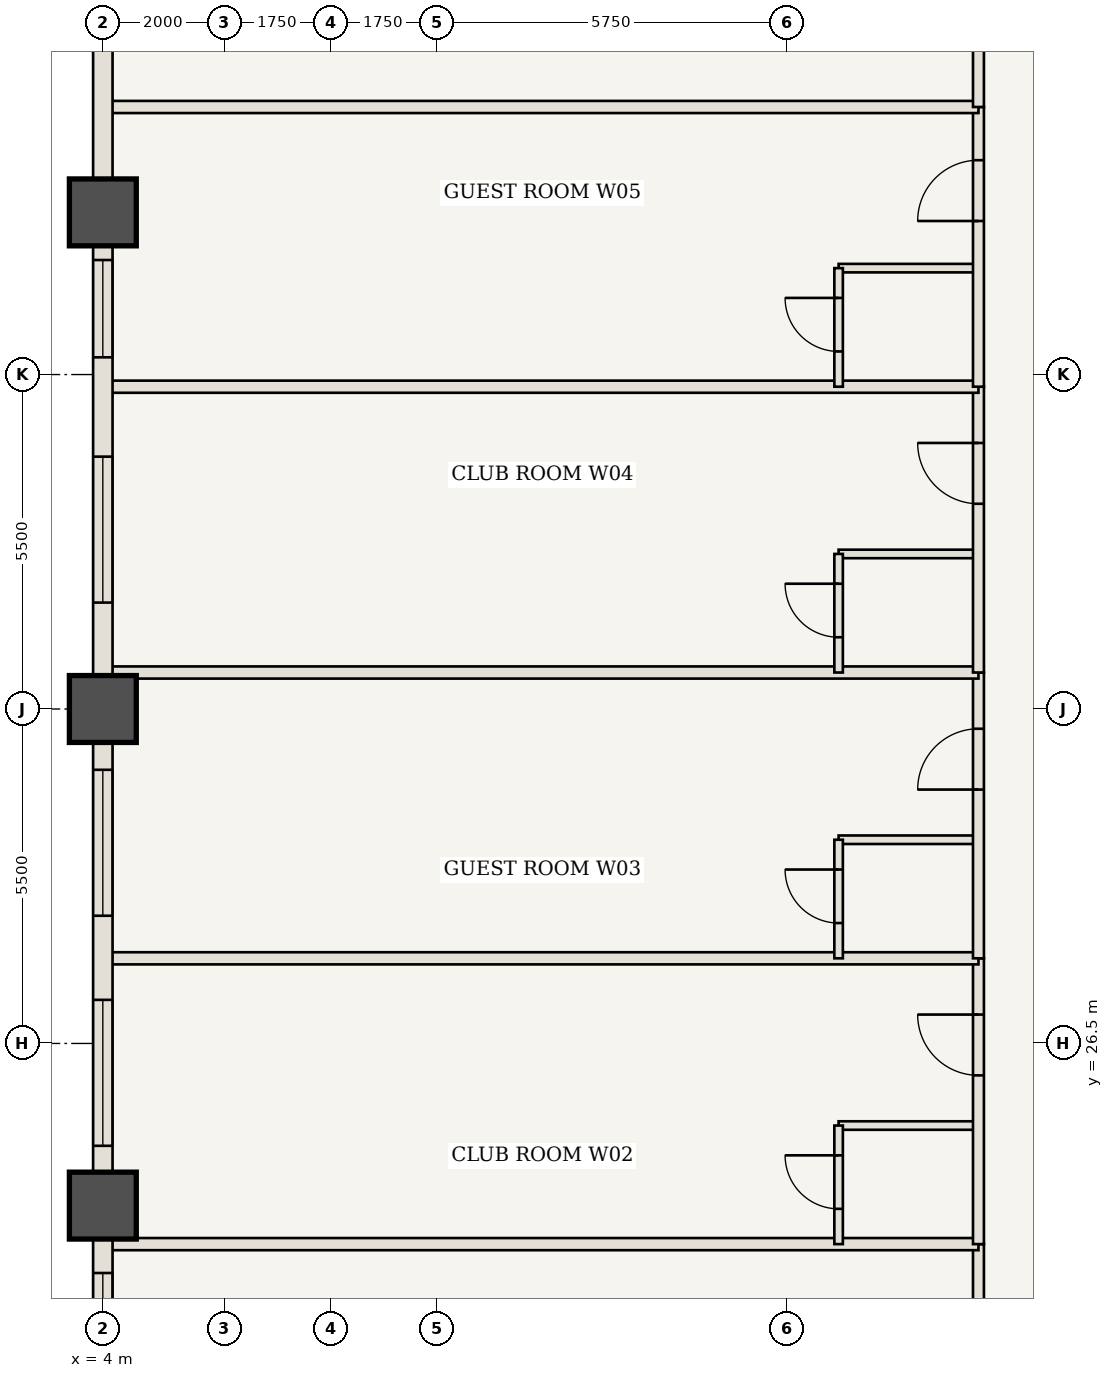
"""IFC4 building model, lengths in metres.
Left out: names, types, materials, properties, quantities, classifications, styles, units other than length and angle.
Written with IfcOpenShell. Run it as: python <this file> out.ifc"""

import sys

from ifc_helpers import new_model, si_unit, direction, frame, frame_2d, origin, origin_2d, place, context, subcontext, project, spatial, rectangle, extrude, element, fill, save


model = new_model("IFC4")
c1 = context("Model", 3, precision=1e-05, world=origin(), true_north=direction((0.0, 1.0)))
c2 = subcontext(c1, "Body", "Model", "MODEL_VIEW")
j1 = project(units=[si_unit("LENGTHUNIT", "METRE"), si_unit("PLANEANGLEUNIT", "RADIAN")], contexts=[c1])
p1 = place(None, origin())
s1 = spatial("IfcSite", under=j1, at=p1, CompositionType="ELEMENT")
p2 = place(p1, origin())
s2 = spatial("IfcBuilding", under=s1, at=p2, CompositionType="ELEMENT")
p3 = place(p2, frame((0.0, 0.0, 38.85)))
s3 = spatial("IfcBuildingStorey", under=s2, at=p3, CompositionType="ELEMENT", Elevation=38.85)
for number, where, z_axis, x_axis in (
    (1, (4.0, 23.833, 0.0), (0.0, 0.0, 1.0), (1.0, 0.0, 0.0)),
    (2, (4.0, 32.0, 0.0), (0.0, 0.0, 1.0), (1.0, 0.0, 0.0)),
    (3, (4.0, 40.167, 0.0), (0.0, 0.0, 1.0), (1.0, 0.0, 0.0)),
):
    element("IfcColumn", number, at=place(p3, frame(where, z_axis=z_axis, x_axis=x_axis)), inside=s3, PredefinedType="COLUMN", context=c2, shape_type="SweptSolid", body=[
        extrude(rectangle(XDim=1.1, YDim=1.1, at=origin_2d()), origin(), (0.0, 0.0, 1.0), 3.5),
    ])
p4 = place(p3, frame((18.4, 18.4, 0.0), z_axis=(0.0, 0.0, 1.0), x_axis=(0.0, 1.0, 0.0)))
e4 = element("IfcWall", 4, at=p4, inside=s3, PredefinedType="STANDARD", context=c2, shape_type="SweptSolid", body=[
    extrude(rectangle(XDim=4.8, YDim=0.18, at=frame_2d((2.4, 0.0))), origin(), (0.0, 0.0, 1.0), 3.08),
])
p5 = place(p4, frame((2.825, 0.0, 0.0)))
e5 = element("IfcOpeningElement", 5, at=p5, cuts=e4, PredefinedType="OPENING", context=c2, shape_type="SweptSolid", body=[
    extrude(rectangle(XDim=1.0, YDim=2.15, at=frame_2d((0.5, 1.075))), frame((0.0, 0.1, 0.0), z_axis=(0.0, -1.0, 0.0), x_axis=(1.0, 0.0, 0.0)), (0.0, 0.0, 1.0), 0.2),
])
p6 = place(p3, frame((4.06, 23.2, 0.0), z_axis=(0.0, 0.0, 1.0), x_axis=(1.0, 0.0, 0.0)))
e6 = element("IfcWall", 6, at=p6, inside=s3, PredefinedType="STANDARD", context=c2, shape_type="SweptSolid", body=[
    extrude(rectangle(XDim=14.34, YDim=0.2, at=frame_2d((7.17, 0.0))), origin(), (0.0, 0.0, 1.0), 3.08),
])
p7 = place(p3, frame((16.1, 25.15, 0.0), z_axis=(0.0, 0.0, 1.0), x_axis=(1.0, 0.0, 0.0)))
e7 = element("IfcWall", 7, at=p7, inside=s3, PredefinedType="STANDARD", context=c2, shape_type="SweptSolid", body=[
    extrude(rectangle(XDim=2.3, YDim=0.14, at=frame_2d((1.15, 0.0))), origin(), (0.0, 0.0, 1.0), 3.08),
])
p8 = place(p3, frame((16.1, 23.2, 0.0), z_axis=(0.0, 0.0, 1.0), x_axis=(0.0, 1.0, 0.0)))
e8 = element("IfcWall", 8, at=p8, inside=s3, PredefinedType="STANDARD", context=c2, shape_type="SweptSolid", body=[
    extrude(rectangle(XDim=1.95, YDim=0.14, at=frame_2d((0.975, 0.0))), origin(), (0.0, 0.0, 1.0), 3.08),
])
p9 = place(p8, frame((0.58, 0.0, 0.0)))
e9 = element("IfcOpeningElement", 9, at=p9, cuts=e8, PredefinedType="OPENING", context=c2, shape_type="SweptSolid", body=[
    extrude(rectangle(XDim=0.88, YDim=2.1, at=frame_2d((0.44, 1.05))), frame((0.0, 0.08, 0.0), z_axis=(0.0, -1.0, 0.0), x_axis=(1.0, 0.0, 0.0)), (0.0, 0.0, 1.0), 0.16),
])
p10 = place(p3, frame((18.4, 23.2, 0.0), z_axis=(0.0, 0.0, 1.0), x_axis=(0.0, 1.0, 0.0)))
e10 = element("IfcWall", 10, at=p10, inside=s3, PredefinedType="STANDARD", context=c2, shape_type="SweptSolid", body=[
    extrude(rectangle(XDim=4.7, YDim=0.18, at=frame_2d((2.35, 0.0))), origin(), (0.0, 0.0, 1.0), 3.08),
])
p11 = place(p10, frame((2.775, 0.0, 0.0)))
e11 = element("IfcOpeningElement", 11, at=p11, cuts=e10, PredefinedType="OPENING", context=c2, shape_type="SweptSolid", body=[
    extrude(rectangle(XDim=1.0, YDim=2.15, at=frame_2d((0.5, 1.075))), frame((0.0, 0.1, 0.0), z_axis=(0.0, -1.0, 0.0), x_axis=(1.0, 0.0, 0.0)), (0.0, 0.0, 1.0), 0.2),
])
p12 = place(p3, frame((4.06, 27.9, 0.0), z_axis=(0.0, 0.0, 1.0), x_axis=(1.0, 0.0, 0.0)))
e12 = element("IfcWall", 12, at=p12, inside=s3, PredefinedType="STANDARD", context=c2, shape_type="SweptSolid", body=[
    extrude(rectangle(XDim=14.34, YDim=0.2, at=frame_2d((7.17, 0.0))), origin(), (0.0, 0.0, 1.0), 3.08),
])
p13 = place(p3, frame((16.1, 29.85, 0.0), z_axis=(0.0, 0.0, 1.0), x_axis=(1.0, 0.0, 0.0)))
e13 = element("IfcWall", 13, at=p13, inside=s3, PredefinedType="STANDARD", context=c2, shape_type="SweptSolid", body=[
    extrude(rectangle(XDim=2.3, YDim=0.14, at=frame_2d((1.15, 0.0))), origin(), (0.0, 0.0, 1.0), 3.08),
])
p14 = place(p3, frame((16.1, 27.9, 0.0), z_axis=(0.0, 0.0, 1.0), x_axis=(0.0, 1.0, 0.0)))
e14 = element("IfcWall", 14, at=p14, inside=s3, PredefinedType="STANDARD", context=c2, shape_type="SweptSolid", body=[
    extrude(rectangle(XDim=1.95, YDim=0.14, at=frame_2d((0.975, 0.0))), origin(), (0.0, 0.0, 1.0), 3.08),
])
p15 = place(p14, frame((0.58, 0.0, 0.0)))
e15 = element("IfcOpeningElement", 15, at=p15, cuts=e14, PredefinedType="OPENING", context=c2, shape_type="SweptSolid", body=[
    extrude(rectangle(XDim=0.88, YDim=2.1, at=frame_2d((0.44, 1.05))), frame((0.0, 0.08, 0.0), z_axis=(0.0, -1.0, 0.0), x_axis=(1.0, 0.0, 0.0)), (0.0, 0.0, 1.0), 0.16),
])
p16 = place(p3, frame((18.4, 27.9, 0.0), z_axis=(0.0, 0.0, 1.0), x_axis=(0.0, 1.0, 0.0)))
e16 = element("IfcWall", 16, at=p16, inside=s3, PredefinedType="STANDARD", context=c2, shape_type="SweptSolid", body=[
    extrude(rectangle(XDim=4.7, YDim=0.18, at=frame_2d((2.35, 0.0))), origin(), (0.0, 0.0, 1.0), 3.08),
])
p17 = place(p16, frame((2.775, 0.0, 0.0)))
e17 = element("IfcOpeningElement", 17, at=p17, cuts=e16, PredefinedType="OPENING", context=c2, shape_type="SweptSolid", body=[
    extrude(rectangle(XDim=1.0, YDim=2.15, at=frame_2d((0.5, 1.075))), frame((0.0, 0.1, 0.0), z_axis=(0.0, -1.0, 0.0), x_axis=(1.0, 0.0, 0.0)), (0.0, 0.0, 1.0), 0.2),
])
p18 = place(p3, frame((4.06, 32.6, 0.0), z_axis=(0.0, 0.0, 1.0), x_axis=(1.0, 0.0, 0.0)))
e18 = element("IfcWall", 18, at=p18, inside=s3, PredefinedType="STANDARD", context=c2, shape_type="SweptSolid", body=[
    extrude(rectangle(XDim=14.34, YDim=0.2, at=frame_2d((7.17, 0.0))), origin(), (0.0, 0.0, 1.0), 3.08),
])
p19 = place(p3, frame((16.1, 34.55, 0.0), z_axis=(0.0, 0.0, 1.0), x_axis=(1.0, 0.0, 0.0)))
e19 = element("IfcWall", 19, at=p19, inside=s3, PredefinedType="STANDARD", context=c2, shape_type="SweptSolid", body=[
    extrude(rectangle(XDim=2.3, YDim=0.14, at=frame_2d((1.15, 0.0))), origin(), (0.0, 0.0, 1.0), 3.08),
])
p20 = place(p3, frame((16.1, 32.6, 0.0), z_axis=(0.0, 0.0, 1.0), x_axis=(0.0, 1.0, 0.0)))
e20 = element("IfcWall", 20, at=p20, inside=s3, PredefinedType="STANDARD", context=c2, shape_type="SweptSolid", body=[
    extrude(rectangle(XDim=1.95, YDim=0.14, at=frame_2d((0.975, 0.0))), origin(), (0.0, 0.0, 1.0), 3.08),
])
p21 = place(p20, frame((0.58, 0.0, 0.0)))
e21 = element("IfcOpeningElement", 21, at=p21, cuts=e20, PredefinedType="OPENING", context=c2, shape_type="SweptSolid", body=[
    extrude(rectangle(XDim=0.88, YDim=2.1, at=frame_2d((0.44, 1.05))), frame((0.0, 0.08, 0.0), z_axis=(0.0, -1.0, 0.0), x_axis=(1.0, 0.0, 0.0)), (0.0, 0.0, 1.0), 0.16),
])
p22 = place(p3, frame((18.4, 32.6, 0.0), z_axis=(0.0, 0.0, 1.0), x_axis=(0.0, 1.0, 0.0)))
e22 = element("IfcWall", 22, at=p22, inside=s3, PredefinedType="STANDARD", context=c2, shape_type="SweptSolid", body=[
    extrude(rectangle(XDim=4.7, YDim=0.18, at=frame_2d((2.35, 0.0))), origin(), (0.0, 0.0, 1.0), 3.08),
])
p23 = place(p22, frame((2.775, 0.0, 0.0)))
e23 = element("IfcOpeningElement", 23, at=p23, cuts=e22, PredefinedType="OPENING", context=c2, shape_type="SweptSolid", body=[
    extrude(rectangle(XDim=1.0, YDim=2.15, at=frame_2d((0.5, 1.075))), frame((0.0, 0.1, 0.0), z_axis=(0.0, -1.0, 0.0), x_axis=(1.0, 0.0, 0.0)), (0.0, 0.0, 1.0), 0.2),
])
p24 = place(p3, frame((4.06, 37.3, 0.0), z_axis=(0.0, 0.0, 1.0), x_axis=(1.0, 0.0, 0.0)))
e24 = element("IfcWall", 24, at=p24, inside=s3, PredefinedType="STANDARD", context=c2, shape_type="SweptSolid", body=[
    extrude(rectangle(XDim=14.34, YDim=0.2, at=frame_2d((7.17, 0.0))), origin(), (0.0, 0.0, 1.0), 3.08),
])
p25 = place(p3, frame((16.1, 39.25, 0.0), z_axis=(0.0, 0.0, 1.0), x_axis=(1.0, 0.0, 0.0)))
e25 = element("IfcWall", 25, at=p25, inside=s3, PredefinedType="STANDARD", context=c2, shape_type="SweptSolid", body=[
    extrude(rectangle(XDim=2.3, YDim=0.14, at=frame_2d((1.15, 0.0))), origin(), (0.0, 0.0, 1.0), 3.08),
])
p26 = place(p3, frame((16.1, 37.3, 0.0), z_axis=(0.0, 0.0, 1.0), x_axis=(0.0, 1.0, 0.0)))
e26 = element("IfcWall", 26, at=p26, inside=s3, PredefinedType="STANDARD", context=c2, shape_type="SweptSolid", body=[
    extrude(rectangle(XDim=1.95, YDim=0.14, at=frame_2d((0.975, 0.0))), origin(), (0.0, 0.0, 1.0), 3.08),
])
p27 = place(p26, frame((0.58, 0.0, 0.0)))
e27 = element("IfcOpeningElement", 27, at=p27, cuts=e26, PredefinedType="OPENING", context=c2, shape_type="SweptSolid", body=[
    extrude(rectangle(XDim=0.88, YDim=2.1, at=frame_2d((0.44, 1.05))), frame((0.0, 0.08, 0.0), z_axis=(0.0, -1.0, 0.0), x_axis=(1.0, 0.0, 0.0)), (0.0, 0.0, 1.0), 0.16),
])
p28 = place(p3, frame((18.4, 37.3, 0.0), z_axis=(0.0, 0.0, 1.0), x_axis=(0.0, 1.0, 0.0)))
e28 = element("IfcWall", 28, at=p28, inside=s3, PredefinedType="STANDARD", context=c2, shape_type="SweptSolid", body=[
    extrude(rectangle(XDim=4.6, YDim=0.18, at=frame_2d((2.3, 0.0))), origin(), (0.0, 0.0, 1.0), 3.08),
])
p29 = place(p28, frame((2.725, 0.0, 0.0)))
e29 = element("IfcOpeningElement", 29, at=p29, cuts=e28, PredefinedType="OPENING", context=c2, shape_type="SweptSolid", body=[
    extrude(rectangle(XDim=1.0, YDim=2.15, at=frame_2d((0.5, 1.075))), frame((0.0, 0.1, 0.0), z_axis=(0.0, -1.0, 0.0), x_axis=(1.0, 0.0, 0.0)), (0.0, 0.0, 1.0), 0.2),
])
p30 = place(p3, frame((4.06, 41.9, 0.0), z_axis=(0.0, 0.0, 1.0), x_axis=(1.0, 0.0, 0.0)))
e30 = element("IfcWall", 30, at=p30, inside=s3, PredefinedType="STANDARD", context=c2, shape_type="SweptSolid", body=[
    extrude(rectangle(XDim=14.34, YDim=0.2, at=frame_2d((7.17, 0.0))), origin(), (0.0, 0.0, 1.0), 3.08),
])
p31 = place(p3, frame((18.4, 41.9, 0.0), z_axis=(0.0, 0.0, 1.0), x_axis=(0.0, 1.0, 0.0)))
e31 = element("IfcWall", 31, at=p31, inside=s3, PredefinedType="STANDARD", context=c2, shape_type="SweptSolid", body=[
    extrude(rectangle(XDim=3.7, YDim=0.18, at=frame_2d((1.85, 0.0))), origin(), (0.0, 0.0, 1.0), 3.08),
])
p32 = place(p31, frame((1.35, 0.0, 0.0)))
e32 = element("IfcOpeningElement", 32, at=p32, cuts=e31, PredefinedType="OPENING", context=c2, shape_type="SweptSolid", body=[
    extrude(rectangle(XDim=1.0, YDim=2.15, at=frame_2d((0.5, 1.075))), frame((0.0, 0.1, 0.0), z_axis=(0.0, -1.0, 0.0), x_axis=(1.0, 0.0, 0.0)), (0.0, 0.0, 1.0), 0.2),
])
p33 = place(p3, frame((4.0, 15.667, 0.0), z_axis=(0.0, 0.0, 1.0), x_axis=(0.0, 1.0, 0.0)))
e33 = element("IfcWall", 33, at=p33, inside=s3, PredefinedType="USERDEFINED", context=c2, shape_type="SweptSolid", body=[
    extrude(rectangle(XDim=8.167, YDim=0.32, at=frame_2d((4.083, 0.0))), origin(), (0.0, 0.0, 1.0), 2.28),
])
p34 = place(p33, frame((0.742, 0.0, 0.85)))
e34 = element("IfcOpeningElement", 34, at=p34, cuts=e33, PredefinedType="OPENING", context=c2, shape_type="SweptSolid", body=[
    extrude(rectangle(XDim=2.8, YDim=1.23, at=frame_2d((1.4, 0.615))), frame((0.0, 0.17, 0.0), z_axis=(0.0, -1.0, 0.0), x_axis=(1.0, 0.0, 0.0)), (0.0, 0.0, 1.0), 0.34),
])
p35 = place(p33, frame((4.658, 0.0, 0.85)))
e35 = element("IfcOpeningElement", 35, at=p35, cuts=e33, PredefinedType="OPENING", context=c2, shape_type="SweptSolid", body=[
    extrude(rectangle(XDim=2.4, YDim=1.23, at=frame_2d((1.2, 0.615))), frame((0.0, 0.17, 0.0), z_axis=(0.0, -1.0, 0.0), x_axis=(1.0, 0.0, 0.0)), (0.0, 0.0, 1.0), 0.34),
])
p36 = place(p3, frame((4.0, 23.833, 0.0), z_axis=(0.0, 0.0, 1.0), x_axis=(0.0, 1.0, 0.0)))
e36 = element("IfcWall", 36, at=p36, inside=s3, PredefinedType="USERDEFINED", context=c2, shape_type="SweptSolid", body=[
    extrude(rectangle(XDim=8.167, YDim=0.32, at=frame_2d((4.083, 0.0))), origin(), (0.0, 0.0, 1.0), 2.28),
])
p37 = place(p36, frame((0.983, 0.0, 0.85)))
e37 = element("IfcOpeningElement", 37, at=p37, cuts=e36, PredefinedType="OPENING", context=c2, shape_type="SweptSolid", body=[
    extrude(rectangle(XDim=2.4, YDim=1.23, at=frame_2d((1.2, 0.615))), frame((0.0, 0.17, 0.0), z_axis=(0.0, -1.0, 0.0), x_axis=(1.0, 0.0, 0.0)), (0.0, 0.0, 1.0), 0.34),
])
p38 = place(p36, frame((4.767, 0.0, 0.85)))
e38 = element("IfcOpeningElement", 38, at=p38, cuts=e36, PredefinedType="OPENING", context=c2, shape_type="SweptSolid", body=[
    extrude(rectangle(XDim=2.4, YDim=1.23, at=frame_2d((1.2, 0.615))), frame((0.0, 0.17, 0.0), z_axis=(0.0, -1.0, 0.0), x_axis=(1.0, 0.0, 0.0)), (0.0, 0.0, 1.0), 0.34),
])
p39 = place(p3, frame((4.0, 32.0, 0.0), z_axis=(0.0, 0.0, 1.0), x_axis=(0.0, 1.0, 0.0)))
e39 = element("IfcWall", 39, at=p39, inside=s3, PredefinedType="USERDEFINED", context=c2, shape_type="SweptSolid", body=[
    extrude(rectangle(XDim=8.167, YDim=0.32, at=frame_2d((4.083, 0.0))), origin(), (0.0, 0.0, 1.0), 2.28),
])
p40 = place(p39, frame((1.75, 0.0, 0.85)))
e40 = element("IfcOpeningElement", 40, at=p40, cuts=e39, PredefinedType="OPENING", context=c2, shape_type="SweptSolid", body=[
    extrude(rectangle(XDim=2.4, YDim=1.23, at=frame_2d((1.2, 0.615))), frame((0.0, 0.17, 0.0), z_axis=(0.0, -1.0, 0.0), x_axis=(1.0, 0.0, 0.0)), (0.0, 0.0, 1.0), 0.34),
])
p41 = place(p39, frame((5.783, 0.0, 0.85)))
e41 = element("IfcOpeningElement", 41, at=p41, cuts=e39, PredefinedType="OPENING", context=c2, shape_type="SweptSolid", body=[
    extrude(rectangle(XDim=1.6, YDim=1.23, at=frame_2d((0.8, 0.615))), frame((0.0, 0.17, 0.0), z_axis=(0.0, -1.0, 0.0), x_axis=(1.0, 0.0, 0.0)), (0.0, 0.0, 1.0), 0.34),
])
p42 = place(p3, frame((4.0, 40.167, 0.0), z_axis=(0.0, 0.0, 1.0), x_axis=(0.0, 1.0, 0.0)))
e42 = element("IfcWall", 42, at=p42, inside=s3, PredefinedType="USERDEFINED", context=c2, shape_type="SweptSolid", body=[
    extrude(rectangle(XDim=8.167, YDim=0.32, at=frame_2d((4.083, 0.0))), origin(), (0.0, 0.0, 1.0), 2.28),
])
p43 = place(p42, frame((4.625, 0.0, 0.85)))
e43 = element("IfcOpeningElement", 43, at=p43, cuts=e42, PredefinedType="OPENING", context=c2, shape_type="SweptSolid", body=[
    extrude(rectangle(XDim=2.8, YDim=1.23, at=frame_2d((1.4, 0.615))), frame((0.0, 0.17, 0.0), z_axis=(0.0, -1.0, 0.0), x_axis=(1.0, 0.0, 0.0)), (0.0, 0.0, 1.0), 0.34),
])
p44 = place(p9, origin())
e44 = element("IfcDoor", 44, at=p44, inside=s3, OperationType="SINGLE_SWING_RIGHT", PredefinedType="DOOR", context=c2, shape_type="SweptSolid", body=[
    extrude(rectangle(XDim=0.88, YDim=2.1, at=frame_2d((0.44, 1.05))), frame((0.0, 0.025, 0.0), z_axis=(0.0, -1.0, 0.0), x_axis=(1.0, 0.0, 0.0)), (0.0, 0.0, 1.0), 0.05),
])
fill(e9, e44)
p45 = place(p11, origin())
e45 = element("IfcDoor", 45, at=p45, inside=s3, OperationType="SINGLE_SWING_RIGHT", PredefinedType="DOOR", context=c2, shape_type="SweptSolid", body=[
    extrude(rectangle(XDim=1.0, YDim=2.15, at=frame_2d((0.5, 1.075))), frame((0.0, 0.025, 0.0), z_axis=(0.0, -1.0, 0.0), x_axis=(1.0, 0.0, 0.0)), (0.0, 0.0, 1.0), 0.05),
])
fill(e11, e45)
p46 = place(p15, origin())
e46 = element("IfcDoor", 46, at=p46, inside=s3, OperationType="SINGLE_SWING_RIGHT", PredefinedType="DOOR", context=c2, shape_type="SweptSolid", body=[
    extrude(rectangle(XDim=0.88, YDim=2.1, at=frame_2d((0.44, 1.05))), frame((0.0, 0.025, 0.0), z_axis=(0.0, -1.0, 0.0), x_axis=(1.0, 0.0, 0.0)), (0.0, 0.0, 1.0), 0.05),
])
fill(e15, e46)
p47 = place(p17, origin())
e47 = element("IfcDoor", 47, at=p47, inside=s3, OperationType="SINGLE_SWING_LEFT", PredefinedType="DOOR", context=c2, shape_type="SweptSolid", body=[
    extrude(rectangle(XDim=1.0, YDim=2.15, at=frame_2d((0.5, 1.075))), frame((0.0, 0.025, 0.0), z_axis=(0.0, -1.0, 0.0), x_axis=(1.0, 0.0, 0.0)), (0.0, 0.0, 1.0), 0.05),
])
fill(e17, e47)
p48 = place(p21, origin())
e48 = element("IfcDoor", 48, at=p48, inside=s3, OperationType="SINGLE_SWING_RIGHT", PredefinedType="DOOR", context=c2, shape_type="SweptSolid", body=[
    extrude(rectangle(XDim=0.88, YDim=2.1, at=frame_2d((0.44, 1.05))), frame((0.0, 0.025, 0.0), z_axis=(0.0, -1.0, 0.0), x_axis=(1.0, 0.0, 0.0)), (0.0, 0.0, 1.0), 0.05),
])
fill(e21, e48)
p49 = place(p23, origin())
e49 = element("IfcDoor", 49, at=p49, inside=s3, OperationType="SINGLE_SWING_RIGHT", PredefinedType="DOOR", context=c2, shape_type="SweptSolid", body=[
    extrude(rectangle(XDim=1.0, YDim=2.15, at=frame_2d((0.5, 1.075))), frame((0.0, 0.025, 0.0), z_axis=(0.0, -1.0, 0.0), x_axis=(1.0, 0.0, 0.0)), (0.0, 0.0, 1.0), 0.05),
])
fill(e23, e49)
p50 = place(p27, origin())
e50 = element("IfcDoor", 50, at=p50, inside=s3, OperationType="SINGLE_SWING_RIGHT", PredefinedType="DOOR", context=c2, shape_type="SweptSolid", body=[
    extrude(rectangle(XDim=0.88, YDim=2.1, at=frame_2d((0.44, 1.05))), frame((0.0, 0.025, 0.0), z_axis=(0.0, -1.0, 0.0), x_axis=(1.0, 0.0, 0.0)), (0.0, 0.0, 1.0), 0.05),
])
fill(e27, e50)
p51 = place(p29, origin())
e51 = element("IfcDoor", 51, at=p51, inside=s3, OperationType="SINGLE_SWING_LEFT", PredefinedType="DOOR", context=c2, shape_type="SweptSolid", body=[
    extrude(rectangle(XDim=1.0, YDim=2.15, at=frame_2d((0.5, 1.075))), frame((0.0, 0.025, 0.0), z_axis=(0.0, -1.0, 0.0), x_axis=(1.0, 0.0, 0.0)), (0.0, 0.0, 1.0), 0.05),
])
fill(e29, e51)
p52 = place(p35, origin())
e52 = element("IfcWindow", 52, at=p52, inside=s3, PartitioningType="SINGLE_PANEL", PredefinedType="WINDOW", context=c2, shape_type="SweptSolid", body=[
    extrude(rectangle(XDim=2.4, YDim=1.23, at=frame_2d((1.2, 0.615))), frame((0.0, 0.03, 0.0), z_axis=(0.0, -1.0, 0.0), x_axis=(1.0, 0.0, 0.0)), (0.0, 0.0, 1.0), 0.06),
])
fill(e35, e52)
p53 = place(p37, origin())
e53 = element("IfcWindow", 53, at=p53, inside=s3, PartitioningType="SINGLE_PANEL", PredefinedType="WINDOW", context=c2, shape_type="SweptSolid", body=[
    extrude(rectangle(XDim=2.4, YDim=1.23, at=frame_2d((1.2, 0.615))), frame((0.0, 0.03, 0.0), z_axis=(0.0, -1.0, 0.0), x_axis=(1.0, 0.0, 0.0)), (0.0, 0.0, 1.0), 0.06),
])
fill(e37, e53)
p54 = place(p38, origin())
e54 = element("IfcWindow", 54, at=p54, inside=s3, PartitioningType="SINGLE_PANEL", PredefinedType="WINDOW", context=c2, shape_type="SweptSolid", body=[
    extrude(rectangle(XDim=2.4, YDim=1.23, at=frame_2d((1.2, 0.615))), frame((0.0, 0.03, 0.0), z_axis=(0.0, -1.0, 0.0), x_axis=(1.0, 0.0, 0.0)), (0.0, 0.0, 1.0), 0.06),
])
fill(e38, e54)
p55 = place(p40, origin())
e55 = element("IfcWindow", 55, at=p55, inside=s3, PartitioningType="SINGLE_PANEL", PredefinedType="WINDOW", context=c2, shape_type="SweptSolid", body=[
    extrude(rectangle(XDim=2.4, YDim=1.23, at=frame_2d((1.2, 0.615))), frame((0.0, 0.03, 0.0), z_axis=(0.0, -1.0, 0.0), x_axis=(1.0, 0.0, 0.0)), (0.0, 0.0, 1.0), 0.06),
])
fill(e40, e55)
p56 = place(p41, origin())
e56 = element("IfcWindow", 56, at=p56, inside=s3, PartitioningType="SINGLE_PANEL", PredefinedType="WINDOW", context=c2, shape_type="SweptSolid", body=[
    extrude(rectangle(XDim=1.6, YDim=1.23, at=frame_2d((0.8, 0.615))), frame((0.0, 0.03, 0.0), z_axis=(0.0, -1.0, 0.0), x_axis=(1.0, 0.0, 0.0)), (0.0, 0.0, 1.0), 0.06),
])
fill(e41, e56)
save(model, sys.argv[1])
